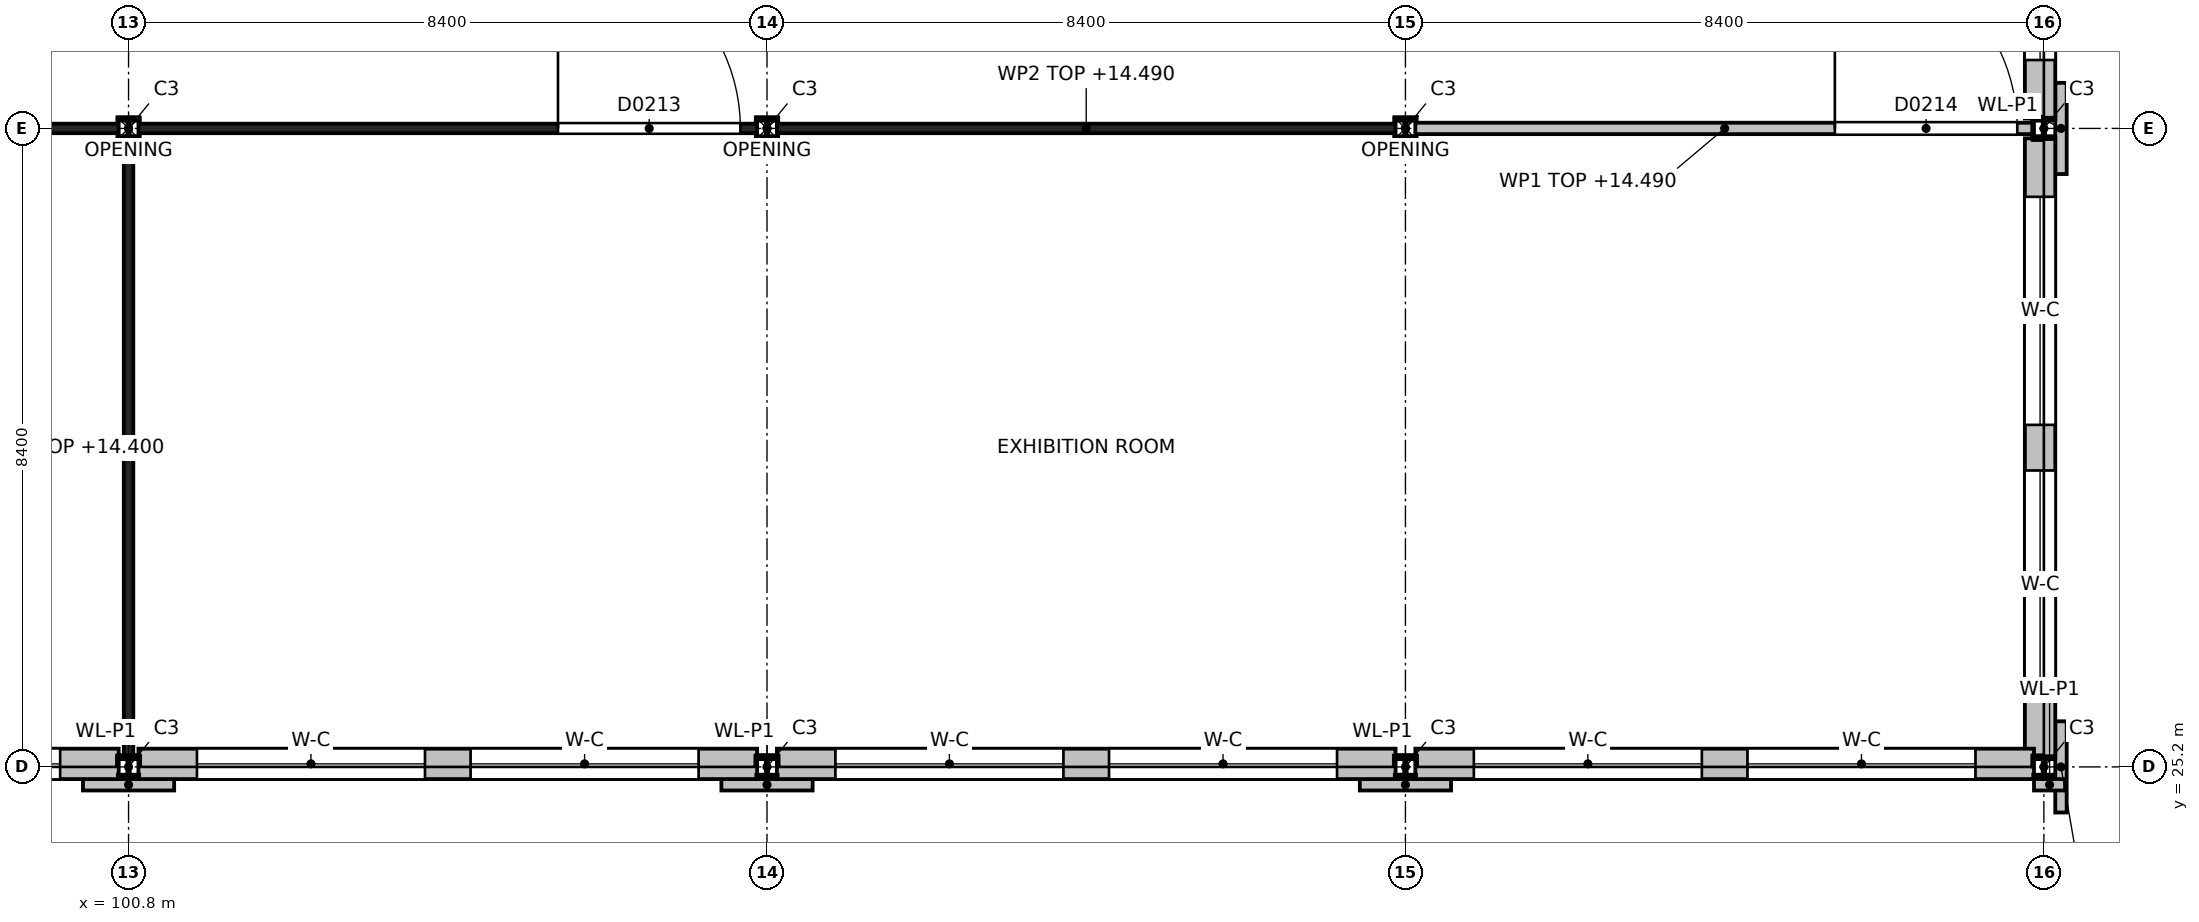
"""IFC4 building model, lengths in metres.
Left out: names, types, materials, properties, quantities, classifications, styles, units other than length and angle.
Written with IfcOpenShell. Run it as: python <this file> out.ifc"""

import sys

from ifc_helpers import new_model, si_unit, direction, frame, frame_2d, origin, origin_2d, place, context, subcontext, project, spatial, rectangle, i_section, extrude, element, fill, save


model = new_model("IFC4")
c1 = context("Model", 3, precision=1e-05, world=origin(), true_north=direction((0.0, 1.0)))
c2 = subcontext(c1, "Body", "Model", "MODEL_VIEW")
j1 = project(units=[si_unit("LENGTHUNIT", "METRE"), si_unit("PLANEANGLEUNIT", "RADIAN")], contexts=[c1])
p1 = place(None, origin())
s1 = spatial("IfcSite", under=j1, at=p1, CompositionType="ELEMENT")
p2 = place(p1, origin())
s2 = spatial("IfcBuilding", under=s1, at=p2, CompositionType="ELEMENT")
p3 = place(p2, frame((0.0, 0.0, 10.8)))
s3 = spatial("IfcBuildingStorey", under=s2, at=p3, CompositionType="ELEMENT", Elevation=10.8)
for number, where, z_axis, x_axis in (
    (1, (100.8, 25.2, 0.0), (0.0, 0.0, 1.0), (1.0, 0.0, 0.0)),
    (2, (100.8, 33.6, 0.0), (0.0, 0.0, 1.0), (1.0, 0.0, 0.0)),
    (3, (109.2, 25.2, 0.0), (0.0, 0.0, 1.0), (1.0, 0.0, 0.0)),
    (4, (109.2, 33.6, 0.0), (0.0, 0.0, 1.0), (1.0, 0.0, 0.0)),
    (5, (117.6, 25.2, 0.0), (0.0, 0.0, 1.0), (1.0, 0.0, 0.0)),
    (6, (117.6, 33.6, 0.0), (0.0, 0.0, 1.0), (1.0, 0.0, 0.0)),
    (7, (126.0, 25.2, 0.0), (0.0, 0.0, 1.0), (1.0, 0.0, 0.0)),
    (8, (126.0, 33.6, 0.0), (0.0, 0.0, 1.0), (1.0, 0.0, 0.0)),
):
    element("IfcColumn", number, at=place(p3, frame(where, z_axis=z_axis, x_axis=x_axis)), inside=s3, PredefinedType="COLUMN", context=c2, shape_type="SweptSolid", body=[
        extrude(i_section(OverallWidth=0.26, OverallDepth=0.26, WebThickness=0.01, FlangeThickness=0.018, at=origin_2d()), origin(), (0.0, 0.0, 1.0), 4.2),
    ])
p4 = place(p3, frame((125.95, 25.33, 0.0), z_axis=(0.0, 0.0, 1.0), x_axis=(0.0, 1.0, 0.0)))
e9 = element("IfcWall", 9, at=p4, inside=s3, PredefinedType="SOLIDWALL", context=c2, shape_type="SweptSolid", body=[
    extrude(rectangle(XDim=8.14, YDim=0.4, at=frame_2d((4.07, 0.0))), origin(), (0.0, 0.0, 1.0), 3.45),
])
p5 = place(p4, frame((0.77, 0.0, 0.9)))
e10 = element("IfcOpeningElement", 10, at=p5, cuts=e9, PredefinedType="OPENING", context=c2, shape_type="SweptSolid", body=[
    extrude(rectangle(XDim=3.0, YDim=2.4, at=frame_2d((1.5, 1.2))), frame((0.0, 0.2, 0.0), z_axis=(0.0, -1.0, 0.0), x_axis=(1.0, 0.0, 0.0)), (0.0, 0.0, 1.0), 0.4),
])
p6 = place(p4, frame((4.37, 0.0, 0.9)))
e11 = element("IfcOpeningElement", 11, at=p6, cuts=e9, PredefinedType="OPENING", context=c2, shape_type="SweptSolid", body=[
    extrude(rectangle(XDim=3.0, YDim=2.4, at=frame_2d((1.5, 1.2))), frame((0.0, 0.2, 0.0), z_axis=(0.0, -1.0, 0.0), x_axis=(1.0, 0.0, 0.0)), (0.0, 0.0, 1.0), 0.4),
])
p7 = place(p3, frame((125.95, 33.73, 0.0), z_axis=(0.0, 0.0, 1.0), x_axis=(0.0, 1.0, 0.0)))
e12 = element("IfcWall", 12, at=p7, inside=s3, PredefinedType="SOLIDWALL", context=c2, shape_type="SweptSolid", body=[
    extrude(rectangle(XDim=8.47, YDim=0.4, at=frame_2d((4.235, 0.0))), origin(), (0.0, 0.0, 1.0), 3.45),
])
p8 = place(p7, frame((0.77, 0.0, 0.9)))
e13 = element("IfcOpeningElement", 13, at=p8, cuts=e12, PredefinedType="OPENING", context=c2, shape_type="SweptSolid", body=[
    extrude(rectangle(XDim=3.0, YDim=2.4, at=frame_2d((1.5, 1.2))), frame((0.0, 0.2, 0.0), z_axis=(0.0, -1.0, 0.0), x_axis=(1.0, 0.0, 0.0)), (0.0, 0.0, 1.0), 0.4),
])
p9 = place(p7, frame((4.37, 0.0, 0.9)))
e14 = element("IfcOpeningElement", 14, at=p9, cuts=e12, PredefinedType="OPENING", context=c2, shape_type="SweptSolid", body=[
    extrude(rectangle(XDim=3.0, YDim=2.4, at=frame_2d((1.5, 1.2))), frame((0.0, 0.2, 0.0), z_axis=(0.0, -1.0, 0.0), x_axis=(1.0, 0.0, 0.0)), (0.0, 0.0, 1.0), 0.4),
])
for number, where, z_axis, x_axis in (
    (15, (126.225, 24.6, 0.0), (0.0, 0.0, 1.0), (0.0, 1.0, 0.0)),
    (16, (126.225, 33.0, 0.0), (0.0, 0.0, 1.0), (0.0, 1.0, 0.0)),
):
    element("IfcWall", number, at=place(p3, frame(where, z_axis=z_axis, x_axis=x_axis)), inside=s3, PredefinedType="SOLIDWALL", context=c2, shape_type="SweptSolid", body=[
        extrude(rectangle(XDim=1.2, YDim=0.15, at=frame_2d((0.6, 0.0))), origin(), (0.0, 0.0, 1.0), 4.2),
    ])
p10 = place(p3, frame((92.53, 25.24, 0.0), z_axis=(0.0, 0.0, 1.0), x_axis=(1.0, 0.0, 0.0)))
e17 = element("IfcWall", 17, at=p10, inside=s3, PredefinedType="SOLIDWALL", context=c2, shape_type="SweptSolid", body=[
    extrude(rectangle(XDim=8.14, YDim=0.4, at=frame_2d((4.07, 0.0))), origin(), (0.0, 0.0, 1.0), 3.45),
])
p11 = place(p10, frame((0.77, 0.0, 0.9)))
e18 = element("IfcOpeningElement", 18, at=p11, cuts=e17, PredefinedType="OPENING", context=c2, shape_type="SweptSolid", body=[
    extrude(rectangle(XDim=3.0, YDim=2.4, at=frame_2d((1.5, 1.2))), frame((0.0, 0.2, 0.0), z_axis=(0.0, -1.0, 0.0), x_axis=(1.0, 0.0, 0.0)), (0.0, 0.0, 1.0), 0.4),
])
p12 = place(p10, frame((4.37, 0.0, 0.9)))
e19 = element("IfcOpeningElement", 19, at=p12, cuts=e17, PredefinedType="OPENING", context=c2, shape_type="SweptSolid", body=[
    extrude(rectangle(XDim=3.0, YDim=2.4, at=frame_2d((1.5, 1.2))), frame((0.0, 0.2, 0.0), z_axis=(0.0, -1.0, 0.0), x_axis=(1.0, 0.0, 0.0)), (0.0, 0.0, 1.0), 0.4),
])
p13 = place(p3, frame((100.93, 25.24, 0.0), z_axis=(0.0, 0.0, 1.0), x_axis=(1.0, 0.0, 0.0)))
e20 = element("IfcWall", 20, at=p13, inside=s3, PredefinedType="SOLIDWALL", context=c2, shape_type="SweptSolid", body=[
    extrude(rectangle(XDim=8.14, YDim=0.4, at=frame_2d((4.07, 0.0))), origin(), (0.0, 0.0, 1.0), 3.45),
])
p14 = place(p13, frame((0.77, 0.0, 0.9)))
e21 = element("IfcOpeningElement", 21, at=p14, cuts=e20, PredefinedType="OPENING", context=c2, shape_type="SweptSolid", body=[
    extrude(rectangle(XDim=3.0, YDim=2.4, at=frame_2d((1.5, 1.2))), frame((0.0, 0.2, 0.0), z_axis=(0.0, -1.0, 0.0), x_axis=(1.0, 0.0, 0.0)), (0.0, 0.0, 1.0), 0.4),
])
p15 = place(p13, frame((4.37, 0.0, 0.9)))
e22 = element("IfcOpeningElement", 22, at=p15, cuts=e20, PredefinedType="OPENING", context=c2, shape_type="SweptSolid", body=[
    extrude(rectangle(XDim=3.0, YDim=2.4, at=frame_2d((1.5, 1.2))), frame((0.0, 0.2, 0.0), z_axis=(0.0, -1.0, 0.0), x_axis=(1.0, 0.0, 0.0)), (0.0, 0.0, 1.0), 0.4),
])
p16 = place(p3, frame((109.33, 25.24, 0.0), z_axis=(0.0, 0.0, 1.0), x_axis=(1.0, 0.0, 0.0)))
e23 = element("IfcWall", 23, at=p16, inside=s3, PredefinedType="SOLIDWALL", context=c2, shape_type="SweptSolid", body=[
    extrude(rectangle(XDim=8.14, YDim=0.4, at=frame_2d((4.07, 0.0))), origin(), (0.0, 0.0, 1.0), 3.45),
])
p17 = place(p16, frame((0.77, 0.0, 0.9)))
e24 = element("IfcOpeningElement", 24, at=p17, cuts=e23, PredefinedType="OPENING", context=c2, shape_type="SweptSolid", body=[
    extrude(rectangle(XDim=3.0, YDim=2.4, at=frame_2d((1.5, 1.2))), frame((0.0, 0.2, 0.0), z_axis=(0.0, -1.0, 0.0), x_axis=(1.0, 0.0, 0.0)), (0.0, 0.0, 1.0), 0.4),
])
p18 = place(p16, frame((4.37, 0.0, 0.9)))
e25 = element("IfcOpeningElement", 25, at=p18, cuts=e23, PredefinedType="OPENING", context=c2, shape_type="SweptSolid", body=[
    extrude(rectangle(XDim=3.0, YDim=2.4, at=frame_2d((1.5, 1.2))), frame((0.0, 0.2, 0.0), z_axis=(0.0, -1.0, 0.0), x_axis=(1.0, 0.0, 0.0)), (0.0, 0.0, 1.0), 0.4),
])
p19 = place(p3, frame((117.73, 25.24, 0.0), z_axis=(0.0, 0.0, 1.0), x_axis=(1.0, 0.0, 0.0)))
e26 = element("IfcWall", 26, at=p19, inside=s3, PredefinedType="SOLIDWALL", context=c2, shape_type="SweptSolid", body=[
    extrude(rectangle(XDim=8.14, YDim=0.4, at=frame_2d((4.07, 0.0))), origin(), (0.0, 0.0, 1.0), 3.45),
])
p20 = place(p19, frame((0.77, 0.0, 0.9)))
e27 = element("IfcOpeningElement", 27, at=p20, cuts=e26, PredefinedType="OPENING", context=c2, shape_type="SweptSolid", body=[
    extrude(rectangle(XDim=3.0, YDim=2.4, at=frame_2d((1.5, 1.2))), frame((0.0, 0.2, 0.0), z_axis=(0.0, -1.0, 0.0), x_axis=(1.0, 0.0, 0.0)), (0.0, 0.0, 1.0), 0.4),
])
p21 = place(p19, frame((4.37, 0.0, 0.9)))
e28 = element("IfcOpeningElement", 28, at=p21, cuts=e26, PredefinedType="OPENING", context=c2, shape_type="SweptSolid", body=[
    extrude(rectangle(XDim=3.0, YDim=2.4, at=frame_2d((1.5, 1.2))), frame((0.0, 0.2, 0.0), z_axis=(0.0, -1.0, 0.0), x_axis=(1.0, 0.0, 0.0)), (0.0, 0.0, 1.0), 0.4),
])
for number, where, z_axis, x_axis in (
    (29, (100.2, 24.965, 0.0), (0.0, 0.0, 1.0), (1.0, 0.0, 0.0)),
    (30, (108.6, 24.965, 0.0), (0.0, 0.0, 1.0), (1.0, 0.0, 0.0)),
    (31, (117.0, 24.965, 0.0), (0.0, 0.0, 1.0), (1.0, 0.0, 0.0)),
):
    element("IfcWall", number, at=place(p3, frame(where, z_axis=z_axis, x_axis=x_axis)), inside=s3, PredefinedType="SOLIDWALL", context=c2, shape_type="SweptSolid", body=[
        extrude(rectangle(XDim=1.2, YDim=0.15, at=frame_2d((0.6, 0.0))), origin(), (0.0, 0.0, 1.0), 4.2),
    ])
p22 = place(p3, frame((125.87, 24.965, 0.0), z_axis=(0.0, 0.0, 1.0), x_axis=(1.0, 0.0, 0.0)))
e32 = element("IfcWall", 32, at=p22, inside=s3, PredefinedType="SOLIDWALL", context=c2, shape_type="SweptSolid", body=[
    extrude(rectangle(XDim=0.41, YDim=0.15, at=frame_2d((0.205, 0.0))), origin(), (0.0, 0.0, 1.0), 4.2),
])
p23 = place(p3, frame((100.8, 25.33, 0.0), z_axis=(0.0, 0.0, 1.0), x_axis=(0.0, 1.0, 0.0)))
e33 = element("IfcWall", 33, at=p23, inside=s3, PredefinedType="PARTITIONING", context=c2, shape_type="SweptSolid", body=[
    extrude(rectangle(XDim=8.14, YDim=0.125, at=frame_2d((4.07, 0.0))), origin(), (0.0, 0.0, 1.0), 3.6),
])
p24 = place(p3, frame((92.53, 33.6, 0.0), z_axis=(0.0, 0.0, 1.0), x_axis=(1.0, 0.0, 0.0)))
e34 = element("IfcWall", 34, at=p24, inside=s3, PredefinedType="PARTITIONING", context=c2, shape_type="SweptSolid", body=[
    extrude(rectangle(XDim=8.14, YDim=0.125, at=frame_2d((4.07, 0.0))), origin(), (0.0, 0.0, 1.0), 3.65),
])
p25 = place(p24, frame((3.12, 0.0, 0.0)))
e35 = element("IfcOpeningElement", 35, at=p25, cuts=e34, PredefinedType="OPENING", context=c2, shape_type="SweptSolid", body=[
    extrude(rectangle(XDim=1.8, YDim=2.1, at=frame_2d((0.9, 1.05))), frame((0.0, 0.062, 0.0), z_axis=(0.0, -1.0, 0.0), x_axis=(1.0, 0.0, 0.0)), (0.0, 0.0, 1.0), 0.125),
])
p26 = place(p3, frame((100.93, 33.6, 0.0), z_axis=(0.0, 0.0, 1.0), x_axis=(1.0, 0.0, 0.0)))
e36 = element("IfcWall", 36, at=p26, inside=s3, PredefinedType="PARTITIONING", context=c2, shape_type="SweptSolid", body=[
    extrude(rectangle(XDim=8.14, YDim=0.125, at=frame_2d((4.07, 0.0))), origin(), (0.0, 0.0, 1.0), 3.65),
])
p27 = place(p26, frame((5.52, 0.0, 0.0)))
e37 = element("IfcOpeningElement", 37, at=p27, cuts=e36, PredefinedType="OPENING", context=c2, shape_type="SweptSolid", body=[
    extrude(rectangle(XDim=2.4, YDim=2.4, at=frame_2d((1.2, 1.2))), frame((0.0, 0.062, 0.0), z_axis=(0.0, -1.0, 0.0), x_axis=(1.0, 0.0, 0.0)), (0.0, 0.0, 1.0), 0.125),
])
p28 = place(p3, frame((109.33, 33.6, 0.0), z_axis=(0.0, 0.0, 1.0), x_axis=(1.0, 0.0, 0.0)))
e38 = element("IfcWall", 38, at=p28, inside=s3, PredefinedType="PARTITIONING", context=c2, shape_type="SweptSolid", body=[
    extrude(rectangle(XDim=8.14, YDim=0.125, at=frame_2d((4.07, 0.0))), origin(), (0.0, 0.0, 1.0), 3.69),
])
p29 = place(p3, frame((117.73, 33.6, 0.0), z_axis=(0.0, 0.0, 1.0), x_axis=(1.0, 0.0, 0.0)))
e39 = element("IfcWall", 39, at=p29, inside=s3, PredefinedType="PARTITIONING", context=c2, shape_type="SweptSolid", body=[
    extrude(rectangle(XDim=8.14, YDim=0.15, at=frame_2d((4.07, 0.0))), origin(), (0.0, 0.0, 1.0), 3.69),
])
p30 = place(p29, frame((5.52, 0.0, 0.0)))
e40 = element("IfcOpeningElement", 40, at=p30, cuts=e39, PredefinedType="OPENING", context=c2, shape_type="SweptSolid", body=[
    extrude(rectangle(XDim=2.4, YDim=2.4, at=frame_2d((1.2, 1.2))), frame((0.0, 0.075, 0.0), z_axis=(0.0, -1.0, 0.0), x_axis=(1.0, 0.0, 0.0)), (0.0, 0.0, 1.0), 0.15),
])
p31 = place(p5, origin())
e41 = element("IfcWindow", 41, at=p31, inside=s3, PartitioningType="SINGLE_PANEL", PredefinedType="WINDOW", context=c2, shape_type="SweptSolid", body=[
    extrude(rectangle(XDim=3.0, YDim=2.4, at=frame_2d((1.5, 1.2))), frame((0.0, 0.03, 0.0), z_axis=(0.0, -1.0, 0.0), x_axis=(1.0, 0.0, 0.0)), (0.0, 0.0, 1.0), 0.06),
])
fill(e10, e41)
p32 = place(p6, origin())
e42 = element("IfcWindow", 42, at=p32, inside=s3, PartitioningType="SINGLE_PANEL", PredefinedType="WINDOW", context=c2, shape_type="SweptSolid", body=[
    extrude(rectangle(XDim=3.0, YDim=2.4, at=frame_2d((1.5, 1.2))), frame((0.0, 0.03, 0.0), z_axis=(0.0, -1.0, 0.0), x_axis=(1.0, 0.0, 0.0)), (0.0, 0.0, 1.0), 0.06),
])
fill(e11, e42)
p33 = place(p8, origin())
e43 = element("IfcWindow", 43, at=p33, inside=s3, PartitioningType="SINGLE_PANEL", PredefinedType="WINDOW", context=c2, shape_type="SweptSolid", body=[
    extrude(rectangle(XDim=3.0, YDim=2.4, at=frame_2d((1.5, 1.2))), frame((0.0, 0.03, 0.0), z_axis=(0.0, -1.0, 0.0), x_axis=(1.0, 0.0, 0.0)), (0.0, 0.0, 1.0), 0.06),
])
fill(e13, e43)
p34 = place(p12, origin())
e44 = element("IfcWindow", 44, at=p34, inside=s3, PartitioningType="SINGLE_PANEL", PredefinedType="WINDOW", context=c2, shape_type="SweptSolid", body=[
    extrude(rectangle(XDim=3.0, YDim=2.4, at=frame_2d((1.5, 1.2))), frame((0.0, 0.03, 0.0), z_axis=(0.0, -1.0, 0.0), x_axis=(1.0, 0.0, 0.0)), (0.0, 0.0, 1.0), 0.06),
])
fill(e19, e44)
p35 = place(p14, origin())
e45 = element("IfcWindow", 45, at=p35, inside=s3, PartitioningType="SINGLE_PANEL", PredefinedType="WINDOW", context=c2, shape_type="SweptSolid", body=[
    extrude(rectangle(XDim=3.0, YDim=2.4, at=frame_2d((1.5, 1.2))), frame((0.0, 0.03, 0.0), z_axis=(0.0, -1.0, 0.0), x_axis=(1.0, 0.0, 0.0)), (0.0, 0.0, 1.0), 0.06),
])
fill(e21, e45)
p36 = place(p15, origin())
e46 = element("IfcWindow", 46, at=p36, inside=s3, PartitioningType="SINGLE_PANEL", PredefinedType="WINDOW", context=c2, shape_type="SweptSolid", body=[
    extrude(rectangle(XDim=3.0, YDim=2.4, at=frame_2d((1.5, 1.2))), frame((0.0, 0.03, 0.0), z_axis=(0.0, -1.0, 0.0), x_axis=(1.0, 0.0, 0.0)), (0.0, 0.0, 1.0), 0.06),
])
fill(e22, e46)
p37 = place(p17, origin())
e47 = element("IfcWindow", 47, at=p37, inside=s3, PartitioningType="SINGLE_PANEL", PredefinedType="WINDOW", context=c2, shape_type="SweptSolid", body=[
    extrude(rectangle(XDim=3.0, YDim=2.4, at=frame_2d((1.5, 1.2))), frame((0.0, 0.03, 0.0), z_axis=(0.0, -1.0, 0.0), x_axis=(1.0, 0.0, 0.0)), (0.0, 0.0, 1.0), 0.06),
])
fill(e24, e47)
p38 = place(p18, origin())
e48 = element("IfcWindow", 48, at=p38, inside=s3, PartitioningType="SINGLE_PANEL", PredefinedType="WINDOW", context=c2, shape_type="SweptSolid", body=[
    extrude(rectangle(XDim=3.0, YDim=2.4, at=frame_2d((1.5, 1.2))), frame((0.0, 0.03, 0.0), z_axis=(0.0, -1.0, 0.0), x_axis=(1.0, 0.0, 0.0)), (0.0, 0.0, 1.0), 0.06),
])
fill(e25, e48)
p39 = place(p20, origin())
e49 = element("IfcWindow", 49, at=p39, inside=s3, PartitioningType="SINGLE_PANEL", PredefinedType="WINDOW", context=c2, shape_type="SweptSolid", body=[
    extrude(rectangle(XDim=3.0, YDim=2.4, at=frame_2d((1.5, 1.2))), frame((0.0, 0.03, 0.0), z_axis=(0.0, -1.0, 0.0), x_axis=(1.0, 0.0, 0.0)), (0.0, 0.0, 1.0), 0.06),
])
fill(e27, e49)
p40 = place(p21, origin())
e50 = element("IfcWindow", 50, at=p40, inside=s3, PartitioningType="SINGLE_PANEL", PredefinedType="WINDOW", context=c2, shape_type="SweptSolid", body=[
    extrude(rectangle(XDim=3.0, YDim=2.4, at=frame_2d((1.5, 1.2))), frame((0.0, 0.03, 0.0), z_axis=(0.0, -1.0, 0.0), x_axis=(1.0, 0.0, 0.0)), (0.0, 0.0, 1.0), 0.06),
])
fill(e28, e50)
p41 = place(p27, origin())
e51 = element("IfcDoor", 51, at=p41, inside=s3, OperationType="DOUBLE_DOOR_DOUBLE_SWING", PredefinedType="DOOR", context=c2, shape_type="SweptSolid", body=[
    extrude(rectangle(XDim=2.4, YDim=2.4, at=frame_2d((1.2, 1.2))), frame((0.0, 0.025, 0.0), z_axis=(0.0, -1.0, 0.0), x_axis=(1.0, 0.0, 0.0)), (0.0, 0.0, 1.0), 0.05),
])
fill(e37, e51)
p42 = place(p30, origin())
e52 = element("IfcDoor", 52, at=p42, inside=s3, OperationType="DOUBLE_DOOR_DOUBLE_SWING", PredefinedType="DOOR", context=c2, shape_type="SweptSolid", body=[
    extrude(rectangle(XDim=2.4, YDim=2.4, at=frame_2d((1.2, 1.2))), frame((0.0, 0.025, 0.0), z_axis=(0.0, -1.0, 0.0), x_axis=(1.0, 0.0, 0.0)), (0.0, 0.0, 1.0), 0.05),
])
fill(e40, e52)
save(model, sys.argv[1])
